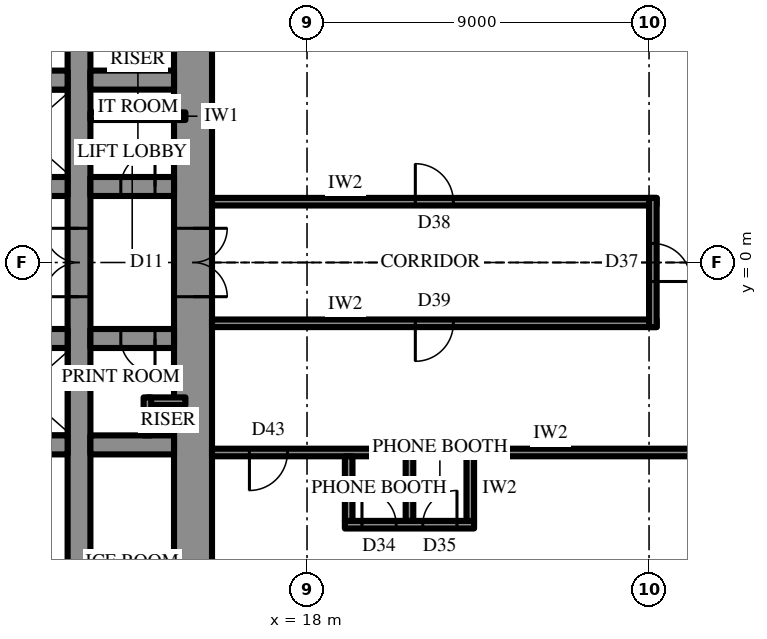
"""IFC4 building model, lengths in metres.
Left out: names, types, materials, properties, quantities, classifications, styles, units other than length and angle.
Written with IfcOpenShell. Run it as: python <this file> out.ifc"""

import sys

from ifc_helpers import new_model, si_unit, direction, frame, frame_2d, origin, place, context, subcontext, project, spatial, rectangle, extrude, element, fill, save


model = new_model("IFC4")
c1 = context("Model", 3, precision=1e-05, world=origin(), true_north=direction((0.0, 1.0)))
c2 = subcontext(c1, "Body", "Model", "MODEL_VIEW")
j1 = project(units=[si_unit("LENGTHUNIT", "METRE"), si_unit("PLANEANGLEUNIT", "RADIAN")], contexts=[c1])
p1 = place(None, origin())
s1 = spatial("IfcSite", under=j1, at=p1, CompositionType="ELEMENT")
p2 = place(p1, origin())
s2 = spatial("IfcBuilding", under=s1, at=p2, CompositionType="ELEMENT")
p3 = place(p2, frame((0.0, 0.0, 286.9)))
s3 = spatial("IfcBuildingStorey", under=s2, at=p3, CompositionType="ELEMENT", Elevation=286.9)
p4 = place(p3, frame((15.0, -10.7, 0.0), z_axis=(0.0, 0.0, 1.0), x_axis=(0.0, 1.0, 0.0)))
e1 = element("IfcWall", 1, at=p4, inside=s3, PredefinedType="SHEAR", context=c2, shape_type="SweptSolid", body=[
    extrude(rectangle(XDim=21.4, YDim=1.0, at=frame_2d((10.7, 0.0))), origin(), (0.0, 0.0, 1.0), 4.2),
])
p5 = place(p4, frame((9.8, 0.0, 0.0)))
e2 = element("IfcOpeningElement", 2, at=p5, cuts=e1, PredefinedType="OPENING", context=c2, shape_type="SweptSolid", body=[
    extrude(rectangle(XDim=1.8, YDim=2.4, at=frame_2d((0.9, 1.2))), frame((0.0, 0.51, 0.0), z_axis=(0.0, -1.0, 0.0), x_axis=(1.0, 0.0, 0.0)), (0.0, 0.0, 1.0), 1.02),
])
p6 = place(p3, frame((12.0, -10.7, 0.0), z_axis=(0.0, 0.0, 1.0), x_axis=(0.0, 1.0, 0.0)))
e3 = element("IfcWall", 3, at=p6, inside=s3, PredefinedType="SHEAR", context=c2, shape_type="SweptSolid", body=[
    extrude(rectangle(XDim=21.4, YDim=0.6, at=frame_2d((10.7, 0.0))), origin(), (0.0, 0.0, 1.0), 4.2),
])
p7 = place(p6, frame((9.8, 0.0, 0.0)))
e4 = element("IfcOpeningElement", 4, at=p7, cuts=e3, PredefinedType="OPENING", context=c2, shape_type="SweptSolid", body=[
    extrude(rectangle(XDim=1.8, YDim=2.4, at=frame_2d((0.9, 1.2))), frame((0.0, 0.31, 0.0), z_axis=(0.0, -1.0, 0.0), x_axis=(1.0, 0.0, 0.0)), (0.0, 0.0, 1.0), 0.62),
])
p8 = place(p3, frame((-3.2, 2.0, 0.0), z_axis=(0.0, 0.0, 1.0), x_axis=(1.0, 0.0, 0.0)))
e5 = element("IfcWall", 5, at=p8, inside=s3, PredefinedType="SHEAR", context=c2, shape_type="SweptSolid", body=[
    extrude(rectangle(XDim=14.9, YDim=0.5, at=frame_2d((7.45, 0.0))), origin(), (0.0, 0.0, 1.0), 4.2),
])
p9 = place(p8, frame((1.15, 0.0, 0.0)))
e6 = element("IfcOpeningElement", 6, at=p9, cuts=e5, PredefinedType="OPENING", context=c2, shape_type="SweptSolid", body=[
    extrude(rectangle(XDim=1.1, YDim=2.2, at=frame_2d((0.55, 1.1))), frame((0.0, 0.26, 0.0), z_axis=(0.0, -1.0, 0.0), x_axis=(1.0, 0.0, 0.0)), (0.0, 0.0, 1.0), 0.52),
])
p10 = place(p8, frame((4.15, 0.0, 0.0)))
e7 = element("IfcOpeningElement", 7, at=p10, cuts=e5, PredefinedType="OPENING", context=c2, shape_type="SweptSolid", body=[
    extrude(rectangle(XDim=1.1, YDim=2.2, at=frame_2d((0.55, 1.1))), frame((0.0, 0.26, 0.0), z_axis=(0.0, -1.0, 0.0), x_axis=(1.0, 0.0, 0.0)), (0.0, 0.0, 1.0), 0.52),
])
p11 = place(p8, frame((7.15, 0.0, 0.0)))
e8 = element("IfcOpeningElement", 8, at=p11, cuts=e5, PredefinedType="OPENING", context=c2, shape_type="SweptSolid", body=[
    extrude(rectangle(XDim=1.1, YDim=2.2, at=frame_2d((0.55, 1.1))), frame((0.0, 0.26, 0.0), z_axis=(0.0, -1.0, 0.0), x_axis=(1.0, 0.0, 0.0)), (0.0, 0.0, 1.0), 0.52),
])
p12 = place(p8, frame((10.15, 0.0, 0.0)))
e9 = element("IfcOpeningElement", 9, at=p12, cuts=e5, PredefinedType="OPENING", context=c2, shape_type="SweptSolid", body=[
    extrude(rectangle(XDim=1.1, YDim=2.2, at=frame_2d((0.55, 1.1))), frame((0.0, 0.26, 0.0), z_axis=(0.0, -1.0, 0.0), x_axis=(1.0, 0.0, 0.0)), (0.0, 0.0, 1.0), 0.52),
])
p13 = place(p3, frame((12.3, 2.0, 0.0), z_axis=(0.0, 0.0, 1.0), x_axis=(1.0, 0.0, 0.0)))
e10 = element("IfcWall", 10, at=p13, inside=s3, PredefinedType="SHEAR", context=c2, shape_type="SweptSolid", body=[
    extrude(rectangle(XDim=2.2, YDim=0.5, at=frame_2d((1.1, 0.0))), origin(), (0.0, 0.0, 1.0), 4.2),
])
p14 = place(p13, frame((0.8, 0.0, 0.0)))
e11 = element("IfcOpeningElement", 11, at=p14, cuts=e10, PredefinedType="OPENING", context=c2, shape_type="SweptSolid", body=[
    extrude(rectangle(XDim=0.9, YDim=2.2, at=frame_2d((0.45, 1.1))), frame((0.0, 0.26, 0.0), z_axis=(0.0, -1.0, 0.0), x_axis=(1.0, 0.0, 0.0)), (0.0, 0.0, 1.0), 0.52),
])
p15 = place(p3, frame((-11.7, 4.8, 0.0), z_axis=(0.0, 0.0, 1.0), x_axis=(1.0, 0.0, 0.0)))
e12 = element("IfcWall", 12, at=p15, inside=s3, PredefinedType="SHEAR", context=c2, shape_type="SweptSolid", body=[
    extrude(rectangle(XDim=23.4, YDim=0.5, at=frame_2d((11.7, 0.0))), origin(), (0.0, 0.0, 1.0), 4.2),
])
p16 = place(p15, frame((6.6, 0.0, 0.0)))
e13 = element("IfcOpeningElement", 13, at=p16, cuts=e12, PredefinedType="OPENING", context=c2, shape_type="SweptSolid", body=[
    extrude(rectangle(XDim=1.2, YDim=2.2, at=frame_2d((0.6, 1.1))), frame((0.0, 0.26, 0.0), z_axis=(0.0, -1.0, 0.0), x_axis=(1.0, 0.0, 0.0)), (0.0, 0.0, 1.0), 0.52),
])
p17 = place(p15, frame((3.6, 0.0, 0.0)))
e14 = element("IfcOpeningElement", 14, at=p17, cuts=e12, PredefinedType="OPENING", context=c2, shape_type="SweptSolid", body=[
    extrude(rectangle(XDim=1.2, YDim=2.2, at=frame_2d((0.6, 1.1))), frame((0.0, 0.26, 0.0), z_axis=(0.0, -1.0, 0.0), x_axis=(1.0, 0.0, 0.0)), (0.0, 0.0, 1.0), 0.52),
])
p18 = place(p3, frame((12.3, 4.8, 0.0), z_axis=(0.0, 0.0, 1.0), x_axis=(1.0, 0.0, 0.0)))
e15 = element("IfcWall", 15, at=p18, inside=s3, PredefinedType="SHEAR", context=c2, shape_type="SweptSolid", body=[
    extrude(rectangle(XDim=2.2, YDim=0.5, at=frame_2d((1.1, 0.0))), origin(), (0.0, 0.0, 1.0), 4.2),
])
p19 = place(p3, frame((14.5, -2.0, 0.0), z_axis=(0.0, 0.0, 1.0), x_axis=(-1.0, 0.0, 0.0)))
e16 = element("IfcWall", 16, at=p19, inside=s3, PredefinedType="SHEAR", context=c2, shape_type="SweptSolid", body=[
    extrude(rectangle(XDim=2.2, YDim=0.5, at=frame_2d((1.1, 0.0))), origin(), (0.0, 0.0, 1.0), 4.2),
])
p20 = place(p19, frame((0.5, 0.0, 0.0)))
e17 = element("IfcOpeningElement", 17, at=p20, cuts=e16, PredefinedType="OPENING", context=c2, shape_type="SweptSolid", body=[
    extrude(rectangle(XDim=0.9, YDim=2.2, at=frame_2d((0.45, 1.1))), frame((0.0, 0.26, 0.0), z_axis=(0.0, -1.0, 0.0), x_axis=(1.0, 0.0, 0.0)), (0.0, 0.0, 1.0), 0.52),
])
p21 = place(p3, frame((11.7, -2.0, 0.0), z_axis=(0.0, 0.0, 1.0), x_axis=(-1.0, 0.0, 0.0)))
e18 = element("IfcWall", 18, at=p21, inside=s3, PredefinedType="SHEAR", context=c2, shape_type="SweptSolid", body=[
    extrude(rectangle(XDim=5.9, YDim=0.5, at=frame_2d((2.95, 0.0))), origin(), (0.0, 0.0, 1.0), 4.2),
])
p22 = place(p3, frame((14.5, -4.8, 0.0), z_axis=(0.0, 0.0, 1.0), x_axis=(-1.0, 0.0, 0.0)))
e19 = element("IfcWall", 19, at=p22, inside=s3, PredefinedType="SHEAR", context=c2, shape_type="SweptSolid", body=[
    extrude(rectangle(XDim=2.2, YDim=0.5, at=frame_2d((1.1, 0.0))), origin(), (0.0, 0.0, 1.0), 4.2),
])
p23 = place(p3, frame((11.7, -4.8, 0.0), z_axis=(0.0, 0.0, 1.0), x_axis=(-1.0, 0.0, 0.0)))
e20 = element("IfcWall", 20, at=p23, inside=s3, PredefinedType="SHEAR", context=c2, shape_type="SweptSolid", body=[
    extrude(rectangle(XDim=23.4, YDim=0.5, at=frame_2d((11.7, 0.0))), origin(), (0.0, 0.0, 1.0), 4.2),
])
p24 = place(p23, frame((6.6, 0.0, 0.0)))
e21 = element("IfcOpeningElement", 21, at=p24, cuts=e20, PredefinedType="OPENING", context=c2, shape_type="SweptSolid", body=[
    extrude(rectangle(XDim=1.2, YDim=2.2, at=frame_2d((0.6, 1.1))), frame((0.0, 0.26, 0.0), z_axis=(0.0, -1.0, 0.0), x_axis=(1.0, 0.0, 0.0)), (0.0, 0.0, 1.0), 0.52),
])
p25 = place(p23, frame((3.6, 0.0, 0.0)))
e22 = element("IfcOpeningElement", 22, at=p25, cuts=e20, PredefinedType="OPENING", context=c2, shape_type="SweptSolid", body=[
    extrude(rectangle(XDim=1.2, YDim=2.2, at=frame_2d((0.6, 1.1))), frame((0.0, 0.26, 0.0), z_axis=(0.0, -1.0, 0.0), x_axis=(1.0, 0.0, 0.0)), (0.0, 0.0, 1.0), 0.52),
])
p26 = place(p3, frame((18.707, -25.299, 0.0), z_axis=(0.0, 0.0, 1.0), x_axis=(0.500000442367, 0.866025148383, 0.0)))
e23 = element("IfcWall", 23, at=p26, inside=s3, PredefinedType="SOLIDWALL", context=c2, shape_type="SweptSolid", body=[
    extrude(rectangle(XDim=25.113, YDim=0.3, at=frame_2d((12.556, 0.0))), origin(), (0.0, 0.0, 1.0), 2.8),
])
p27 = place(p26, frame((4.278, 0.0, 0.6)))
e24 = element("IfcOpeningElement", 24, at=p27, cuts=e23, PredefinedType="OPENING", context=c2, shape_type="SweptSolid", body=[
    extrude(rectangle(XDim=2.7, YDim=1.95, at=frame_2d((1.35, 0.975))), frame((0.0, 0.16, 0.0), z_axis=(0.0, -1.0, 0.0), x_axis=(1.0, 0.0, 0.0)), (0.0, 0.0, 1.0), 0.32),
])
p28 = place(p26, frame((9.647, 0.0, 0.0)))
e25 = element("IfcOpeningElement", 25, at=p28, cuts=e23, PredefinedType="OPENING", context=c2, shape_type="SweptSolid", body=[
    extrude(rectangle(XDim=1.2, YDim=2.4, at=frame_2d((0.6, 1.2))), frame((0.0, 0.16, 0.0), z_axis=(0.0, -1.0, 0.0), x_axis=(1.0, 0.0, 0.0)), (0.0, 0.0, 1.0), 0.32),
])
p29 = place(p26, frame((13.516, 0.0, 0.6)))
e26 = element("IfcOpeningElement", 26, at=p29, cuts=e23, PredefinedType="OPENING", context=c2, shape_type="SweptSolid", body=[
    extrude(rectangle(XDim=2.7, YDim=1.95, at=frame_2d((1.35, 0.975))), frame((0.0, 0.16, 0.0), z_axis=(0.0, -1.0, 0.0), x_axis=(1.0, 0.0, 0.0)), (0.0, 0.0, 1.0), 0.32),
])
p30 = place(p26, frame((18.135, 0.0, 0.6)))
e27 = element("IfcOpeningElement", 27, at=p30, cuts=e23, PredefinedType="OPENING", context=c2, shape_type="SweptSolid", body=[
    extrude(rectangle(XDim=2.7, YDim=1.95, at=frame_2d((1.35, 0.975))), frame((0.0, 0.16, 0.0), z_axis=(0.0, -1.0, 0.0), x_axis=(1.0, 0.0, 0.0)), (0.0, 0.0, 1.0), 0.32),
])
p31 = place(p3, frame((12.3, 3.85, 0.0), z_axis=(0.0, 0.0, 1.0), x_axis=(1.0, 0.0, 0.0)))
e28 = element("IfcWall", 28, at=p31, inside=s3, PredefinedType="PARTITIONING", context=c2, shape_type="SweptSolid", body=[
    extrude(rectangle(XDim=2.5, YDim=0.2, at=frame_2d((1.25, 0.0))), origin(), (0.0, 0.0, 1.0), 4.0),
])
for number, where, z_axis, x_axis in (
    (29, (14.8, -3.65, 0.0), (0.0, 0.0, 1.0), (-1.0, 0.0, 0.0)),
    (30, (13.8, -3.55, 0.0), (0.0, 0.0, 1.0), (0.0, -1.0, 0.0)),
):
    element("IfcWall", number, at=place(p3, frame(where, z_axis=z_axis, x_axis=x_axis)), inside=s3, PredefinedType="PARTITIONING", context=c2, shape_type="SweptSolid", body=[
        extrude(rectangle(XDim=1.0, YDim=0.2, at=frame_2d((0.5, 0.0))), origin(), (0.0, 0.0, 1.0), 4.0),
    ])
p32 = place(p3, frame((15.5, 1.6, 0.0), z_axis=(0.0, 0.0, 1.0), x_axis=(1.0, 0.0, 0.0)))
e31 = element("IfcWall", 31, at=p32, inside=s3, PredefinedType="PARTITIONING", context=c2, shape_type="SweptSolid", body=[
    extrude(rectangle(XDim=11.7, YDim=0.2, at=frame_2d((5.85, 0.0))), origin(), (0.0, 0.0, 1.0), 4.0),
])
p33 = place(p32, frame((5.35, 0.0, 0.0)))
e32 = element("IfcOpeningElement", 32, at=p33, cuts=e31, PredefinedType="OPENING", context=c2, shape_type="SweptSolid", body=[
    extrude(rectangle(XDim=1.0, YDim=2.2, at=frame_2d((0.5, 1.1))), frame((0.0, 0.11, 0.0), z_axis=(0.0, -1.0, 0.0), x_axis=(1.0, 0.0, 0.0)), (0.0, 0.0, 1.0), 0.22),
])
p34 = place(p3, frame((15.5, -1.6, 0.0), z_axis=(0.0, 0.0, 1.0), x_axis=(1.0, 0.0, 0.0)))
e33 = element("IfcWall", 33, at=p34, inside=s3, PredefinedType="PARTITIONING", context=c2, shape_type="SweptSolid", body=[
    extrude(rectangle(XDim=11.7, YDim=0.2, at=frame_2d((5.85, 0.0))), origin(), (0.0, 0.0, 1.0), 4.0),
])
p35 = place(p34, frame((5.35, 0.0, 0.0)))
e34 = element("IfcOpeningElement", 34, at=p35, cuts=e33, PredefinedType="OPENING", context=c2, shape_type="SweptSolid", body=[
    extrude(rectangle(XDim=1.0, YDim=2.2, at=frame_2d((0.5, 1.1))), frame((0.0, 0.11, 0.0), z_axis=(0.0, -1.0, 0.0), x_axis=(1.0, 0.0, 0.0)), (0.0, 0.0, 1.0), 0.22),
])
p36 = place(p3, frame((27.1, -1.7, 0.0), z_axis=(0.0, 0.0, 1.0), x_axis=(0.0, 1.0, 0.0)))
e35 = element("IfcWall", 35, at=p36, inside=s3, PredefinedType="PARTITIONING", context=c2, shape_type="SweptSolid", body=[
    extrude(rectangle(XDim=3.4, YDim=0.2, at=frame_2d((1.7, 0.0))), origin(), (0.0, 0.0, 1.0), 4.0),
])
p37 = place(p36, frame((1.2, 0.0, 0.0)))
e36 = element("IfcOpeningElement", 36, at=p37, cuts=e35, PredefinedType="OPENING", context=c2, shape_type="SweptSolid", body=[
    extrude(rectangle(XDim=1.0, YDim=2.2, at=frame_2d((0.5, 1.1))), frame((0.0, 0.11, 0.0), z_axis=(0.0, -1.0, 0.0), x_axis=(1.0, 0.0, 0.0)), (0.0, 0.0, 1.0), 0.22),
])
p38 = place(p3, frame((15.5, -5.0, 0.0), z_axis=(0.0, 0.0, 1.0), x_axis=(1.0, 0.0, 0.0)))
e37 = element("IfcWall", 37, at=p38, inside=s3, PredefinedType="PARTITIONING", context=c2, shape_type="SweptSolid", body=[
    extrude(rectangle(XDim=14.845, YDim=0.2, at=frame_2d((7.423, 0.0))), origin(), (0.0, 0.0, 1.0), 4.0),
])
p39 = place(p38, frame((0.985, 0.0, 0.0)))
e38 = element("IfcOpeningElement", 38, at=p39, cuts=e37, PredefinedType="OPENING", context=c2, shape_type="SweptSolid", body=[
    extrude(rectangle(XDim=1.0, YDim=2.2, at=frame_2d((0.5, 1.1))), frame((0.0, 0.11, 0.0), z_axis=(0.0, -1.0, 0.0), x_axis=(1.0, 0.0, 0.0)), (0.0, 0.0, 1.0), 0.22),
])
p40 = place(p3, frame((18.996, -6.9, 0.0), z_axis=(0.0, 0.0, 1.0), x_axis=(1.0, 0.0, 0.0)))
e39 = element("IfcWall", 39, at=p40, inside=s3, PredefinedType="PARTITIONING", context=c2, shape_type="SweptSolid", body=[
    extrude(rectangle(XDim=3.4, YDim=0.2, at=frame_2d((1.7, 0.0))), origin(), (0.0, 0.0, 1.0), 4.0),
])
p41 = place(p40, frame((0.45, 0.0, 0.0)))
e40 = element("IfcOpeningElement", 40, at=p41, cuts=e39, PredefinedType="OPENING", context=c2, shape_type="SweptSolid", body=[
    extrude(rectangle(XDim=0.9, YDim=2.2, at=frame_2d((0.45, 1.1))), frame((0.0, 0.11, 0.0), z_axis=(0.0, -1.0, 0.0), x_axis=(1.0, 0.0, 0.0)), (0.0, 0.0, 1.0), 0.22),
])
p42 = place(p40, frame((2.05, 0.0, 0.0)))
e41 = element("IfcOpeningElement", 41, at=p42, cuts=e39, PredefinedType="OPENING", context=c2, shape_type="SweptSolid", body=[
    extrude(rectangle(XDim=0.9, YDim=2.2, at=frame_2d((0.45, 1.1))), frame((0.0, 0.11, 0.0), z_axis=(0.0, -1.0, 0.0), x_axis=(1.0, 0.0, 0.0)), (0.0, 0.0, 1.0), 0.22),
])
for number, where, z_axis, x_axis in (
    (42, (19.096, -5.1, 0.0), (0.0, 0.0, 1.0), (0.0, -1.0, 0.0)),
    (43, (20.696, -5.1, 0.0), (0.0, 0.0, 1.0), (0.0, -1.0, 0.0)),
    (44, (22.296, -5.1, 0.0), (0.0, 0.0, 1.0), (0.0, -1.0, 0.0)),
):
    element("IfcWall", number, at=place(p3, frame(where, z_axis=z_axis, x_axis=x_axis)), inside=s3, PredefinedType="PARTITIONING", context=c2, shape_type="SweptSolid", body=[
        extrude(rectangle(XDim=1.7, YDim=0.2, at=frame_2d((0.85, 0.0))), origin(), (0.0, 0.0, 1.0), 4.0),
    ])
p43 = place(p30, origin())
e45 = element("IfcWindow", 45, at=p43, inside=s3, PartitioningType="SINGLE_PANEL", PredefinedType="WINDOW", context=c2, shape_type="SweptSolid", body=[
    extrude(rectangle(XDim=2.7, YDim=1.95, at=frame_2d((1.35, 0.975))), frame((0.0, 0.03, 0.0), z_axis=(0.0, -1.0, 0.0), x_axis=(1.0, 0.0, 0.0)), (0.0, 0.0, 1.0), 0.06),
])
fill(e27, e45)
p44 = place(p5, frame((1.8, 0.0, 0.0), z_axis=(0.0, 0.0, 1.0), x_axis=(-1.0, 0.0, 0.0)))
e46 = element("IfcDoor", 46, at=p44, inside=s3, OperationType="DOUBLE_DOOR_SINGLE_SWING", PredefinedType="DOOR", context=c2, shape_type="SweptSolid", body=[
    extrude(rectangle(XDim=1.8, YDim=2.4, at=frame_2d((0.9, 1.2))), frame((0.0, 0.025, 0.0), z_axis=(0.0, -1.0, 0.0), x_axis=(1.0, 0.0, 0.0)), (0.0, 0.0, 1.0), 0.05),
])
fill(e2, e46)
p45 = place(p14, origin())
e47 = element("IfcDoor", 47, at=p45, inside=s3, OperationType="SINGLE_SWING_LEFT", PredefinedType="DOOR", context=c2, shape_type="SweptSolid", body=[
    extrude(rectangle(XDim=0.9, YDim=2.2, at=frame_2d((0.45, 1.1))), frame((0.0, 0.025, 0.0), z_axis=(0.0, -1.0, 0.0), x_axis=(1.0, 0.0, 0.0)), (0.0, 0.0, 1.0), 0.05),
])
fill(e11, e47)
p46 = place(p20, origin())
e48 = element("IfcDoor", 48, at=p46, inside=s3, OperationType="SINGLE_SWING_RIGHT", PredefinedType="DOOR", context=c2, shape_type="SweptSolid", body=[
    extrude(rectangle(XDim=0.9, YDim=2.2, at=frame_2d((0.45, 1.1))), frame((0.0, 0.025, 0.0), z_axis=(0.0, -1.0, 0.0), x_axis=(1.0, 0.0, 0.0)), (0.0, 0.0, 1.0), 0.05),
])
fill(e17, e48)
p47 = place(p7, origin())
e49 = element("IfcDoor", 49, at=p47, inside=s3, OperationType="DOUBLE_DOOR_SINGLE_SWING", PredefinedType="DOOR", context=c2, shape_type="SweptSolid", body=[
    extrude(rectangle(XDim=1.8, YDim=2.4, at=frame_2d((0.9, 1.2))), frame((0.0, 0.025, 0.0), z_axis=(0.0, -1.0, 0.0), x_axis=(1.0, 0.0, 0.0)), (0.0, 0.0, 1.0), 0.05),
])
fill(e4, e49)
p48 = place(p33, origin())
e50 = element("IfcDoor", 50, at=p48, inside=s3, OperationType="SINGLE_SWING_RIGHT", PredefinedType="DOOR", context=c2, shape_type="SweptSolid", body=[
    extrude(rectangle(XDim=1.0, YDim=2.2, at=frame_2d((0.5, 1.1))), frame((0.0, 0.025, 0.0), z_axis=(0.0, -1.0, 0.0), x_axis=(1.0, 0.0, 0.0)), (0.0, 0.0, 1.0), 0.05),
])
fill(e32, e50)
p49 = place(p35, frame((1.0, 0.0, 0.0), z_axis=(0.0, 0.0, 1.0), x_axis=(-1.0, 0.0, 0.0)))
e51 = element("IfcDoor", 51, at=p49, inside=s3, OperationType="SINGLE_SWING_LEFT", PredefinedType="DOOR", context=c2, shape_type="SweptSolid", body=[
    extrude(rectangle(XDim=1.0, YDim=2.2, at=frame_2d((0.5, 1.1))), frame((0.0, 0.025, 0.0), z_axis=(0.0, -1.0, 0.0), x_axis=(1.0, 0.0, 0.0)), (0.0, 0.0, 1.0), 0.05),
])
fill(e34, e51)
p50 = place(p37, frame((1.0, 0.0, 0.0), z_axis=(0.0, 0.0, 1.0), x_axis=(-1.0, 0.0, 0.0)))
e52 = element("IfcDoor", 52, at=p50, inside=s3, OperationType="SINGLE_SWING_LEFT", PredefinedType="DOOR", context=c2, shape_type="SweptSolid", body=[
    extrude(rectangle(XDim=1.0, YDim=2.2, at=frame_2d((0.5, 1.1))), frame((0.0, 0.025, 0.0), z_axis=(0.0, -1.0, 0.0), x_axis=(1.0, 0.0, 0.0)), (0.0, 0.0, 1.0), 0.05),
])
fill(e36, e52)
p51 = place(p39, frame((1.0, 0.0, 0.0), z_axis=(0.0, 0.0, 1.0), x_axis=(-1.0, 0.0, 0.0)))
e53 = element("IfcDoor", 53, at=p51, inside=s3, OperationType="SINGLE_SWING_LEFT", PredefinedType="DOOR", context=c2, shape_type="SweptSolid", body=[
    extrude(rectangle(XDim=1.0, YDim=2.2, at=frame_2d((0.5, 1.1))), frame((0.0, 0.025, 0.0), z_axis=(0.0, -1.0, 0.0), x_axis=(1.0, 0.0, 0.0)), (0.0, 0.0, 1.0), 0.05),
])
fill(e38, e53)
p52 = place(p41, origin())
e54 = element("IfcDoor", 54, at=p52, inside=s3, OperationType="SINGLE_SWING_RIGHT", PredefinedType="DOOR", context=c2, shape_type="SweptSolid", body=[
    extrude(rectangle(XDim=0.9, YDim=2.2, at=frame_2d((0.45, 1.1))), frame((0.0, 0.025, 0.0), z_axis=(0.0, -1.0, 0.0), x_axis=(1.0, 0.0, 0.0)), (0.0, 0.0, 1.0), 0.05),
])
fill(e40, e54)
p53 = place(p42, origin())
e55 = element("IfcDoor", 55, at=p53, inside=s3, OperationType="SINGLE_SWING_LEFT", PredefinedType="DOOR", context=c2, shape_type="SweptSolid", body=[
    extrude(rectangle(XDim=0.9, YDim=2.2, at=frame_2d((0.45, 1.1))), frame((0.0, 0.025, 0.0), z_axis=(0.0, -1.0, 0.0), x_axis=(1.0, 0.0, 0.0)), (0.0, 0.0, 1.0), 0.05),
])
fill(e41, e55)
save(model, sys.argv[1])
